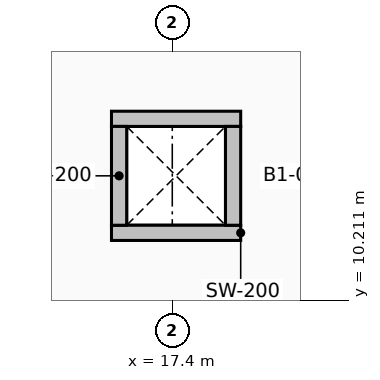
"""IFC4 building model, lengths in metres.
Left out: names, types, materials, properties, quantities, classifications, styles, units other than length and angle.
Written with IfcOpenShell. Run it as: python <this file> out.ifc"""

import sys

from ifc_helpers import new_model, si_unit, direction, frame, frame_2d, origin, place, context, subcontext, project, spatial, rectangle, extrude, element, save


model = new_model("IFC4")
c1 = context("Model", 3, precision=1e-05, world=origin(), true_north=direction((0.0, 1.0)))
c2 = subcontext(c1, "Body", "Model", "MODEL_VIEW")
j1 = project(units=[si_unit("LENGTHUNIT", "METRE"), si_unit("PLANEANGLEUNIT", "RADIAN")], contexts=[c1])
p1 = place(None, origin())
s1 = spatial("IfcSite", under=j1, at=p1, CompositionType="ELEMENT")
p2 = place(p1, origin())
s2 = spatial("IfcBuilding", under=s1, at=p2, CompositionType="ELEMENT")
p3 = place(p2, frame((0.0, 0.0, -4.8)))
s3 = spatial("IfcBuildingStorey", under=s2, at=p3, CompositionType="ELEMENT", Elevation=-4.8)
for number, where, z_axis, x_axis in (
    (1, (16.6, 11.1, 0.0), (0.0, 0.0, 1.0), (1.0, 0.0, 0.0)),
    (2, (18.3, 12.6, 0.0), (0.0, 0.0, 1.0), (-1.0, 0.0, 0.0)),
):
    element("IfcWall", number, at=place(p3, frame(where, z_axis=z_axis, x_axis=x_axis)), inside=s3, PredefinedType="PARTITIONING", context=c2, shape_type="SweptSolid", body=[
        extrude(rectangle(XDim=1.7, YDim=0.2, at=frame_2d((0.85, 0.0))), origin(), (0.0, 0.0, 1.0), 4.5),
    ])
for number, where, z_axis, x_axis in (
    (3, (16.7, 11.2, 0.0), (0.0, 0.0, 1.0), (0.0, 1.0, 0.0)),
    (4, (18.2, 12.5, 0.0), (0.0, 0.0, 1.0), (0.0, -1.0, 0.0)),
):
    element("IfcWall", number, at=place(p3, frame(where, z_axis=z_axis, x_axis=x_axis)), inside=s3, PredefinedType="PARTITIONING", context=c2, shape_type="SweptSolid", body=[
        extrude(rectangle(XDim=1.3, YDim=0.2, at=frame_2d((0.65, 0.0))), origin(), (0.0, 0.0, 1.0), 4.5),
    ])
save(model, sys.argv[1])
